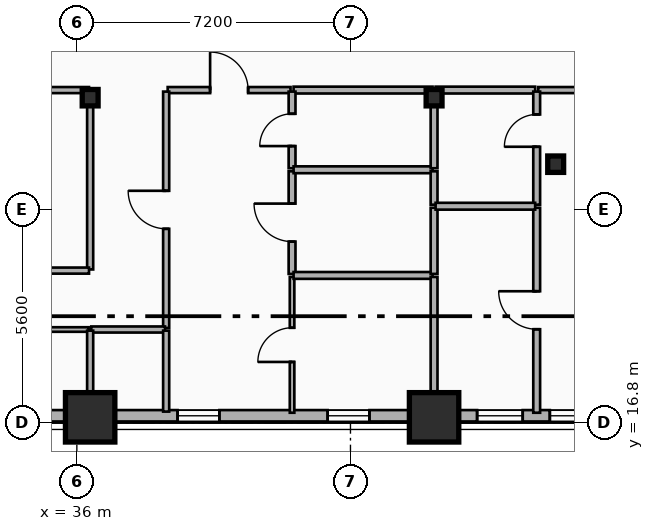
"""IFC4 building model, lengths in metres.
Left out: names, types, materials, properties, quantities, classifications, styles, units other than length and angle.
Written with IfcOpenShell. Run it as: python <this file> out.ifc"""

import sys

from ifc_helpers import new_model, si_unit, direction, frame, frame_2d, origin, origin_2d, place, context, subcontext, project, spatial, rectangle, i_section, extrude, element, fill, save


model = new_model("IFC4")
c1 = context("Model", 3, precision=1e-05, world=origin(), true_north=direction((0.0, 1.0)))
c2 = subcontext(c1, "Body", "Model", "MODEL_VIEW")
j1 = project(units=[si_unit("LENGTHUNIT", "METRE"), si_unit("PLANEANGLEUNIT", "RADIAN")], contexts=[c1])
p1 = place(None, origin())
s1 = spatial("IfcSite", under=j1, at=p1, CompositionType="ELEMENT")
p2 = place(p1, origin())
s2 = spatial("IfcBuilding", under=s1, at=p2, CompositionType="ELEMENT")
p3 = place(p2, frame((0.0, 0.0, 101.3)))
s3 = spatial("IfcBuildingStorey", under=s2, at=p3, CompositionType="ELEMENT", Elevation=101.3)
for number, where, z_axis, x_axis in (
    (1, (36.35, 25.35, 0.0), (0.0, 0.0, 1.0), (1.0, 0.0, 0.0)),
    (2, (45.4, 25.35, 0.0), (0.0, 0.0, 1.0), (1.0, 0.0, 0.0)),
):
    element("IfcColumn", number, at=place(p3, frame(where, z_axis=z_axis, x_axis=x_axis)), inside=s3, PredefinedType="COLUMN", context=c2, shape_type="SweptSolid", body=[
        extrude(i_section(OverallWidth=0.418, OverallDepth=0.432, WebThickness=0.035, FlangeThickness=0.056, FilletRadius=0.015, at=origin_2d()), origin(), (0.0, 0.0, 1.0), 3.5),
    ])
for number, where, z_axis, x_axis in (
    (3, (36.35, 17.048, 0.0), (0.0, -0.09, 0.996), (1.0, 0.0, 0.0)),
    (4, (45.4, 17.048, 0.0), (0.0, -0.09, 0.996), (1.0, 0.0, 0.0)),
):
    element("IfcColumn", number, at=place(p3, frame(where, z_axis=z_axis, x_axis=x_axis)), inside=s3, PredefinedType="COLUMN", context=c2, shape_type="SweptSolid", body=[
        extrude(rectangle(XDim=1.3, YDim=1.3, at=origin_2d()), origin(), (0.0, 0.0, 1.0), 3.514),
    ])
p4 = place(p3, frame((48.6, 23.6, 0.0), z_axis=(0.0, 0.0, 1.0), x_axis=(1.0, 0.0, 0.0)))
e5 = element("IfcColumn", 5, at=p4, inside=s3, PredefinedType="COLUMN", context=c2, shape_type="SweptSolid", body=[
    extrude(i_section(OverallWidth=0.418, OverallDepth=0.432, WebThickness=0.035, FlangeThickness=0.056, FilletRadius=0.015, at=origin_2d()), origin(), (0.0, 0.0, 1.0), 3.5),
])
p5 = place(p3, frame((53.4, 16.98, 0.0), z_axis=(0.0, 0.0, 1.0), x_axis=(-1.0, 0.0, 0.0)))
e6 = element("IfcWall", 6, at=p5, inside=s3, PredefinedType="SOLIDWALL", context=c2, shape_type="SweptSolid", body=[
    extrude(rectangle(XDim=49.2, YDim=0.3, at=frame_2d((24.6, 0.0))), origin(), (0.0, 0.0, 1.0), 2.86),
])
p6 = place(p5, frame((44.246, 0.0, 0.48)))
e7 = element("IfcOpeningElement", 7, at=p6, cuts=e6, PredefinedType="OPENING", context=c2, shape_type="SweptSolid", body=[
    extrude(rectangle(XDim=1.6, YDim=1.95, at=frame_2d((0.8, 0.975))), frame((0.0, 0.16, 0.0), z_axis=(0.0, -1.0, 0.0), x_axis=(1.0, 0.0, 0.0)), (0.0, 0.0, 1.0), 0.32),
])
p7 = place(p5, frame((42.333, 0.0, 0.68)))
e8 = element("IfcOpeningElement", 8, at=p7, cuts=e6, PredefinedType="OPENING", context=c2, shape_type="SweptSolid", body=[
    extrude(rectangle(XDim=1.2, YDim=1.5, at=frame_2d((0.6, 0.75))), frame((0.0, 0.16, 0.0), z_axis=(0.0, -1.0, 0.0), x_axis=(1.0, 0.0, 0.0)), (0.0, 0.0, 1.0), 0.32),
])
p8 = place(p5, frame((33.338, 0.0, 1.48)))
e9 = element("IfcOpeningElement", 9, at=p8, cuts=e6, PredefinedType="OPENING", context=c2, shape_type="SweptSolid", body=[
    extrude(rectangle(XDim=1.1, YDim=1.05, at=frame_2d((0.55, 0.525))), frame((0.0, 0.16, 0.0), z_axis=(0.0, -1.0, 0.0), x_axis=(1.0, 0.0, 0.0)), (0.0, 0.0, 1.0), 0.32),
])
p9 = place(p5, frame((38.935, 0.0, 0.48)))
e10 = element("IfcOpeningElement", 10, at=p9, cuts=e6, PredefinedType="OPENING", context=c2, shape_type="SweptSolid", body=[
    extrude(rectangle(XDim=1.2, YDim=1.5, at=frame_2d((0.6, 0.75))), frame((0.0, 0.16, 0.0), z_axis=(0.0, -1.0, 0.0), x_axis=(1.0, 0.0, 0.0)), (0.0, 0.0, 1.0), 0.32),
])
p10 = place(p5, frame((20.025, 0.0, 0.73)))
e11 = element("IfcOpeningElement", 11, at=p10, cuts=e6, PredefinedType="OPENING", context=c2, shape_type="SweptSolid", body=[
    extrude(rectangle(XDim=1.6, YDim=1.95, at=frame_2d((0.8, 0.975))), frame((0.0, 0.16, 0.0), z_axis=(0.0, -1.0, 0.0), x_axis=(1.0, 0.0, 0.0)), (0.0, 0.0, 1.0), 0.32),
])
p11 = place(p5, frame((13.65, 0.0, 0.52)))
e12 = element("IfcOpeningElement", 12, at=p11, cuts=e6, PredefinedType="OPENING", context=c2, shape_type="SweptSolid", body=[
    extrude(rectangle(XDim=1.1, YDim=1.05, at=frame_2d((0.55, 0.525))), frame((0.0, 0.16, 0.0), z_axis=(0.0, -1.0, 0.0), x_axis=(1.0, 0.0, 0.0)), (0.0, 0.0, 1.0), 0.32),
])
p12 = place(p5, frame((9.701, 0.0, 1.48)))
e13 = element("IfcOpeningElement", 13, at=p12, cuts=e6, PredefinedType="OPENING", context=c2, shape_type="SweptSolid", body=[
    extrude(rectangle(XDim=1.1, YDim=1.05, at=frame_2d((0.55, 0.525))), frame((0.0, 0.16, 0.0), z_axis=(0.0, -1.0, 0.0), x_axis=(1.0, 0.0, 0.0)), (0.0, 0.0, 1.0), 0.32),
])
p13 = place(p5, frame((3.354, 0.0, 0.48)))
e14 = element("IfcOpeningElement", 14, at=p13, cuts=e6, PredefinedType="OPENING", context=c2, shape_type="SweptSolid", body=[
    extrude(rectangle(XDim=1.6, YDim=1.95, at=frame_2d((0.8, 0.975))), frame((0.0, 0.16, 0.0), z_axis=(0.0, -1.0, 0.0), x_axis=(1.0, 0.0, 0.0)), (0.0, 0.0, 1.0), 0.32),
])
p14 = place(p5, frame((5.667, 0.0, 0.68)))
e15 = element("IfcOpeningElement", 15, at=p14, cuts=e6, PredefinedType="OPENING", context=c2, shape_type="SweptSolid", body=[
    extrude(rectangle(XDim=1.2, YDim=1.5, at=frame_2d((0.6, 0.75))), frame((0.0, 0.16, 0.0), z_axis=(0.0, -1.0, 0.0), x_axis=(1.0, 0.0, 0.0)), (0.0, 0.0, 1.0), 0.32),
])
p15 = place(p3, frame((38.39, 25.55, 0.0), z_axis=(0.0, 0.0, 1.0), x_axis=(1.0, 0.0, 0.0)))
e16 = element("IfcWall", 16, at=p15, inside=s3, PredefinedType="PARTITIONING", context=c2, shape_type="SweptSolid", body=[
    extrude(rectangle(XDim=3.233, YDim=0.16, at=frame_2d((1.617, 0.0))), origin(), (0.0, 0.0, 1.0), 3.24),
])
p16 = place(p15, frame((1.116, 0.0, 0.0)))
e17 = element("IfcOpeningElement", 17, at=p16, cuts=e16, PredefinedType="OPENING", context=c2, shape_type="SweptSolid", body=[
    extrude(rectangle(XDim=1.0, YDim=2.15, at=frame_2d((0.5, 1.075))), frame((0.0, 0.09, 0.0), z_axis=(0.0, -1.0, 0.0), x_axis=(1.0, 0.0, 0.0)), (0.0, 0.0, 1.0), 0.18),
])
p17 = place(p3, frame((41.703, 25.55, 0.0), z_axis=(0.0, 0.0, 1.0), x_axis=(1.0, 0.0, 0.0)))
e18 = element("IfcWall", 18, at=p17, inside=s3, PredefinedType="PLUMBINGWALL", context=c2, shape_type="SweptSolid", body=[
    extrude(rectangle(XDim=3.657, YDim=0.18, at=frame_2d((1.829, 0.0))), origin(), (0.0, 0.0, 1.0), 2.31),
])
p18 = place(p3, frame((48.14, 25.55, 0.0), z_axis=(0.0, 0.0, 1.0), x_axis=(1.0, 0.0, 0.0)))
e19 = element("IfcWall", 19, at=p18, inside=s3, PredefinedType="PARTITIONING", context=c2, shape_type="SweptSolid", body=[
    extrude(rectangle(XDim=4.338, YDim=0.16, at=frame_2d((2.169, 0.0))), origin(), (0.0, 0.0, 1.0), 2.57),
])
p19 = place(p18, frame((1.669, 0.0, 0.0)))
e20 = element("IfcOpeningElement", 20, at=p19, cuts=e19, PredefinedType="OPENING", context=c2, shape_type="SweptSolid", body=[
    extrude(rectangle(XDim=1.0, YDim=2.15, at=frame_2d((0.5, 1.075))), frame((0.0, 0.09, 0.0), z_axis=(0.0, -1.0, 0.0), x_axis=(1.0, 0.0, 0.0)), (0.0, 0.0, 1.0), 0.18),
])
p20 = place(p3, frame((45.44, 25.55, 0.0), z_axis=(0.0, 0.0, 1.0), x_axis=(1.0, 0.0, 0.0)))
e21 = element("IfcWall", 21, at=p20, inside=s3, PredefinedType="PLUMBINGWALL", context=c2, shape_type="SweptSolid", body=[
    extrude(rectangle(XDim=2.62, YDim=0.18, at=frame_2d((1.31, 0.0))), origin(), (0.0, 0.0, 1.0), 2.31),
])
p21 = place(p3, frame((38.35, 19.29, 0.0), z_axis=(0.0, 0.0, 1.0), x_axis=(0.0, 1.0, 0.0)))
e22 = element("IfcWall", 22, at=p21, inside=s3, PredefinedType="PARTITIONING", context=c2, shape_type="SweptSolid", body=[
    extrude(rectangle(XDim=6.22, YDim=0.16, at=frame_2d((3.11, 0.0))), origin(), (0.0, 0.0, 1.0), 2.73),
])
p22 = place(p21, frame((2.61, 0.0, 0.0)))
e23 = element("IfcOpeningElement", 23, at=p22, cuts=e22, PredefinedType="OPENING", context=c2, shape_type="SweptSolid", body=[
    extrude(rectangle(XDim=1.0, YDim=2.15, at=frame_2d((0.5, 1.075))), frame((0.0, 0.09, 0.0), z_axis=(0.0, -1.0, 0.0), x_axis=(1.0, 0.0, 0.0)), (0.0, 0.0, 1.0), 0.18),
])
p23 = place(p3, frame((22.84, 19.25, 0.0), z_axis=(0.0, 0.0, 1.0), x_axis=(1.0, 0.0, 0.0)))
e24 = element("IfcWall", 24, at=p23, inside=s3, PredefinedType="PARTITIONING", context=c2, shape_type="SweptSolid", body=[
    extrude(rectangle(XDim=13.47, YDim=0.12, at=frame_2d((6.735, 0.0))), origin(), (0.0, 0.0, 1.0), 2.31),
])
p24 = place(p23, frame((6.285, 0.0, 0.0)))
e25 = element("IfcOpeningElement", 25, at=p24, cuts=e24, PredefinedType="OPENING", context=c2, shape_type="SweptSolid", body=[
    extrude(rectangle(XDim=0.9, YDim=2.1, at=frame_2d((0.45, 1.05))), frame((0.0, 0.07, 0.0), z_axis=(0.0, -1.0, 0.0), x_axis=(1.0, 0.0, 0.0)), (0.0, 0.0, 1.0), 0.14),
])
p25 = place(p3, frame((41.663, 17.06, 0.0), z_axis=(0.0, 0.0, 1.0), x_axis=(0.0, 1.0, 0.0)))
e26 = element("IfcWall", 26, at=p25, inside=s3, PredefinedType="PARTITIONING", context=c2, shape_type="SweptSolid", body=[
    extrude(rectangle(XDim=3.573, YDim=0.12, at=frame_2d((1.787, 0.0))), origin(), (0.0, 0.0, 1.0), 2.73),
])
p26 = place(p25, frame((1.336, 0.0, 0.0)))
e27 = element("IfcOpeningElement", 27, at=p26, cuts=e26, PredefinedType="OPENING", context=c2, shape_type="SweptSolid", body=[
    extrude(rectangle(XDim=0.9, YDim=2.1, at=frame_2d((0.45, 1.05))), frame((0.0, 0.07, 0.0), z_axis=(0.0, -1.0, 0.0), x_axis=(1.0, 0.0, 0.0)), (0.0, 0.0, 1.0), 0.14),
])
p27 = place(p3, frame((41.663, 20.713, 0.0), z_axis=(0.0, 0.0, 1.0), x_axis=(0.0, 1.0, 0.0)))
e28 = element("IfcWall", 28, at=p27, inside=s3, PredefinedType="PLUMBINGWALL", context=c2, shape_type="SweptSolid", body=[
    extrude(rectangle(XDim=2.7, YDim=0.18, at=frame_2d((1.35, 0.0))), origin(), (0.0, 0.0, 1.0), 2.73),
])
p28 = place(p27, frame((0.85, 0.0, 0.0)))
e29 = element("IfcOpeningElement", 29, at=p28, cuts=e28, PredefinedType="OPENING", context=c2, shape_type="SweptSolid", body=[
    extrude(rectangle(XDim=1.0, YDim=2.15, at=frame_2d((0.5, 1.075))), frame((0.0, 0.1, 0.0), z_axis=(0.0, -1.0, 0.0), x_axis=(1.0, 0.0, 0.0)), (0.0, 0.0, 1.0), 0.2),
])
p29 = place(p3, frame((41.663, 23.493, 0.0), z_axis=(0.0, 0.0, 1.0), x_axis=(0.0, 1.0, 0.0)))
e30 = element("IfcWall", 30, at=p29, inside=s3, PredefinedType="PLUMBINGWALL", context=c2, shape_type="SweptSolid", body=[
    extrude(rectangle(XDim=2.017, YDim=0.18, at=frame_2d((1.009, 0.0))), origin(), (0.0, 0.0, 1.0), 3.24),
])
p30 = place(p29, frame((0.583, 0.0, 0.0)))
e31 = element("IfcOpeningElement", 31, at=p30, cuts=e30, PredefinedType="OPENING", context=c2, shape_type="SweptSolid", body=[
    extrude(rectangle(XDim=0.85, YDim=2.1, at=frame_2d((0.425, 1.05))), frame((0.0, 0.1, 0.0), z_axis=(0.0, -1.0, 0.0), x_axis=(1.0, 0.0, 0.0)), (0.0, 0.0, 1.0), 0.2),
])
p31 = place(p3, frame((41.703, 20.673, 0.0), z_axis=(0.0, 0.0, 1.0), x_axis=(1.0, 0.0, 0.0)))
e32 = element("IfcWall", 32, at=p31, inside=s3, PredefinedType="PLUMBINGWALL", context=c2, shape_type="SweptSolid", body=[
    extrude(rectangle(XDim=3.657, YDim=0.18, at=frame_2d((1.829, 0.0))), origin(), (0.0, 0.0, 1.0), 2.31),
])
p32 = place(p3, frame((45.4, 17.06, 0.0), z_axis=(0.0, 0.0, 1.0), x_axis=(0.0, 1.0, 0.0)))
e33 = element("IfcWall", 33, at=p32, inside=s3, PredefinedType="PLUMBINGWALL", context=c2, shape_type="SweptSolid", body=[
    extrude(rectangle(XDim=3.573, YDim=0.18, at=frame_2d((1.787, 0.0))), origin(), (0.0, 0.0, 1.0), 2.31),
])
p33 = place(p3, frame((41.703, 23.453, 0.0), z_axis=(0.0, 0.0, 1.0), x_axis=(1.0, 0.0, 0.0)))
e34 = element("IfcWall", 34, at=p33, inside=s3, PredefinedType="PLUMBINGWALL", context=c2, shape_type="SweptSolid", body=[
    extrude(rectangle(XDim=3.657, YDim=0.18, at=frame_2d((1.829, 0.0))), origin(), (0.0, 0.0, 1.0), 2.31),
])
p34 = place(p3, frame((45.4, 20.713, 0.0), z_axis=(0.0, 0.0, 1.0), x_axis=(0.0, 1.0, 0.0)))
e35 = element("IfcWall", 35, at=p34, inside=s3, PredefinedType="PLUMBINGWALL", context=c2, shape_type="SweptSolid", body=[
    extrude(rectangle(XDim=1.741, YDim=0.18, at=frame_2d((0.871, 0.0))), origin(), (0.0, 0.0, 1.0), 2.31),
])
p35 = place(p3, frame((45.4, 22.534, 0.0), z_axis=(0.0, 0.0, 1.0), x_axis=(0.0, 1.0, 0.0)))
e36 = element("IfcWall", 36, at=p35, inside=s3, PredefinedType="PLUMBINGWALL", context=c2, shape_type="SweptSolid", body=[
    extrude(rectangle(XDim=0.879, YDim=0.18, at=frame_2d((0.439, 0.0))), origin(), (0.0, 0.0, 1.0), 2.31),
])
p36 = place(p3, frame((45.4, 23.493, 0.0), z_axis=(0.0, 0.0, 1.0), x_axis=(0.0, 1.0, 0.0)))
e37 = element("IfcWall", 37, at=p36, inside=s3, PredefinedType="PLUMBINGWALL", context=c2, shape_type="SweptSolid", body=[
    extrude(rectangle(XDim=2.017, YDim=0.18, at=frame_2d((1.009, 0.0))), origin(), (0.0, 0.0, 1.0), 2.31),
])
p37 = place(p3, frame((48.1, 17.06, 0.0), z_axis=(0.0, 0.0, 1.0), x_axis=(0.0, 1.0, 0.0)))
e38 = element("IfcWall", 38, at=p37, inside=s3, PredefinedType="PLUMBINGWALL", context=c2, shape_type="SweptSolid", body=[
    extrude(rectangle(XDim=5.394, YDim=0.18, at=frame_2d((2.697, 0.0))), origin(), (0.0, 0.0, 1.0), 2.72),
])
p38 = place(p37, frame((2.197, 0.0, 0.0)))
e39 = element("IfcOpeningElement", 39, at=p38, cuts=e38, PredefinedType="OPENING", context=c2, shape_type="SweptSolid", body=[
    extrude(rectangle(XDim=1.0, YDim=2.15, at=frame_2d((0.5, 1.075))), frame((0.0, 0.1, 0.0), z_axis=(0.0, -1.0, 0.0), x_axis=(1.0, 0.0, 0.0)), (0.0, 0.0, 1.0), 0.2),
])
p39 = place(p3, frame((48.1, 22.534, 0.0), z_axis=(0.0, 0.0, 1.0), x_axis=(0.0, 1.0, 0.0)))
e40 = element("IfcWall", 40, at=p39, inside=s3, PredefinedType="PLUMBINGWALL", context=c2, shape_type="SweptSolid", body=[
    extrude(rectangle(XDim=2.976, YDim=0.18, at=frame_2d((1.488, 0.0))), origin(), (0.0, 0.0, 1.0), 2.72),
])
p40 = place(p39, frame((1.524, 0.0, 0.0)))
e41 = element("IfcOpeningElement", 41, at=p40, cuts=e40, PredefinedType="OPENING", context=c2, shape_type="SweptSolid", body=[
    extrude(rectangle(XDim=0.85, YDim=2.1, at=frame_2d((0.425, 1.05))), frame((0.0, 0.1, 0.0), z_axis=(0.0, -1.0, 0.0), x_axis=(1.0, 0.0, 0.0)), (0.0, 0.0, 1.0), 0.2),
])
p41 = place(p3, frame((45.44, 22.494, 0.0), z_axis=(0.0, 0.0, 1.0), x_axis=(1.0, 0.0, 0.0)))
e42 = element("IfcWall", 42, at=p41, inside=s3, PredefinedType="PLUMBINGWALL", context=c2, shape_type="SweptSolid", body=[
    extrude(rectangle(XDim=2.62, YDim=0.18, at=frame_2d((1.31, 0.0))), origin(), (0.0, 0.0, 1.0), 2.31),
])
p42 = place(p3, frame((22.83, 25.55, 0.0), z_axis=(0.0, 0.0, 1.0), x_axis=(1.0, 0.0, 0.0)))
e43 = element("IfcWall", 43, at=p42, inside=s3, PredefinedType="PARTITIONING", context=c2, shape_type="SweptSolid", body=[
    extrude(rectangle(XDim=13.49, YDim=0.16, at=frame_2d((6.745, 0.0))), origin(), (0.0, 0.0, 1.0), 2.31),
])
p43 = place(p3, frame((36.38, 19.25, 0.0), z_axis=(0.0, 0.0, 1.0), x_axis=(1.0, 0.0, 0.0)))
e44 = element("IfcWall", 44, at=p43, inside=s3, PredefinedType="PARTITIONING", context=c2, shape_type="SweptSolid", body=[
    extrude(rectangle(XDim=1.94, YDim=0.16, at=frame_2d((0.97, 0.0))), origin(), (0.0, 0.0, 1.0), 2.31),
])
p44 = place(p3, frame((36.35, 20.83, 0.0), z_axis=(0.0, 0.0, 1.0), x_axis=(0.0, 1.0, 0.0)))
e45 = element("IfcWall", 45, at=p44, inside=s3, PredefinedType="PARTITIONING", context=c2, shape_type="SweptSolid", body=[
    extrude(rectangle(XDim=4.69, YDim=0.16, at=frame_2d((2.345, 0.0))), origin(), (0.0, 0.0, 1.0), 2.31),
])
p45 = place(p3, frame((34.48, 20.8, 0.0), z_axis=(0.0, 0.0, 1.0), x_axis=(1.0, 0.0, 0.0)))
e46 = element("IfcWall", 46, at=p45, inside=s3, PredefinedType="PARTITIONING", context=c2, shape_type="SweptSolid", body=[
    extrude(rectangle(XDim=1.84, YDim=0.16, at=frame_2d((0.92, 0.0))), origin(), (0.0, 0.0, 1.0), 2.31),
])
p46 = place(p3, frame((36.35, 17.09, 0.0), z_axis=(0.0, 0.0, 1.0), x_axis=(0.0, 1.0, 0.0)))
e47 = element("IfcWall", 47, at=p46, inside=s3, PredefinedType="PARTITIONING", context=c2, shape_type="SweptSolid", body=[
    extrude(rectangle(XDim=2.13, YDim=0.16, at=frame_2d((1.065, 0.0))), origin(), (0.0, 0.0, 1.0), 2.31),
])
p47 = place(p3, frame((38.35, 17.09, 0.0), z_axis=(0.0, 0.0, 1.0), x_axis=(0.0, 1.0, 0.0)))
e48 = element("IfcWall", 48, at=p47, inside=s3, PredefinedType="PARTITIONING", context=c2, shape_type="SweptSolid", body=[
    extrude(rectangle(XDim=2.13, YDim=0.16, at=frame_2d((1.065, 0.0))), origin(), (0.0, 0.0, 1.0), 2.86),
])
p48 = place(p11, origin())
e49 = element("IfcWindow", 49, at=p48, inside=s3, PartitioningType="SINGLE_PANEL", PredefinedType="WINDOW", context=c2, shape_type="SweptSolid", body=[
    extrude(rectangle(XDim=1.1, YDim=1.05, at=frame_2d((0.55, 0.525))), frame((0.0, 0.03, 0.0), z_axis=(0.0, -1.0, 0.0), x_axis=(1.0, 0.0, 0.0)), (0.0, 0.0, 1.0), 0.06),
])
fill(e12, e49)
p49 = place(p12, origin())
e50 = element("IfcWindow", 50, at=p49, inside=s3, PartitioningType="SINGLE_PANEL", PredefinedType="WINDOW", context=c2, shape_type="SweptSolid", body=[
    extrude(rectangle(XDim=1.1, YDim=1.05, at=frame_2d((0.55, 0.525))), frame((0.0, 0.03, 0.0), z_axis=(0.0, -1.0, 0.0), x_axis=(1.0, 0.0, 0.0)), (0.0, 0.0, 1.0), 0.06),
])
fill(e13, e50)
p50 = place(p13, origin())
e51 = element("IfcWindow", 51, at=p50, inside=s3, PartitioningType="SINGLE_PANEL", PredefinedType="WINDOW", context=c2, shape_type="SweptSolid", body=[
    extrude(rectangle(XDim=1.6, YDim=1.95, at=frame_2d((0.8, 0.975))), frame((0.0, 0.03, 0.0), z_axis=(0.0, -1.0, 0.0), x_axis=(1.0, 0.0, 0.0)), (0.0, 0.0, 1.0), 0.06),
])
fill(e14, e51)
p51 = place(p14, origin())
e52 = element("IfcWindow", 52, at=p51, inside=s3, PartitioningType="SINGLE_PANEL", PredefinedType="WINDOW", context=c2, shape_type="SweptSolid", body=[
    extrude(rectangle(XDim=1.2, YDim=1.5, at=frame_2d((0.6, 0.75))), frame((0.0, 0.03, 0.0), z_axis=(0.0, -1.0, 0.0), x_axis=(1.0, 0.0, 0.0)), (0.0, 0.0, 1.0), 0.06),
])
fill(e15, e52)
p52 = place(p16, origin())
e53 = element("IfcDoor", 53, at=p52, inside=s3, OperationType="SINGLE_SWING_LEFT", PredefinedType="DOOR", context=c2, shape_type="SweptSolid", body=[
    extrude(rectangle(XDim=1.0, YDim=2.15, at=frame_2d((0.5, 1.075))), frame((0.0, 0.025, 0.0), z_axis=(0.0, -1.0, 0.0), x_axis=(1.0, 0.0, 0.0)), (0.0, 0.0, 1.0), 0.05),
])
fill(e17, e53)
p53 = place(p22, origin())
e54 = element("IfcDoor", 54, at=p53, inside=s3, OperationType="SINGLE_SWING_RIGHT", PredefinedType="DOOR", context=c2, shape_type="SweptSolid", body=[
    extrude(rectangle(XDim=1.0, YDim=2.15, at=frame_2d((0.5, 1.075))), frame((0.0, 0.025, 0.0), z_axis=(0.0, -1.0, 0.0), x_axis=(1.0, 0.0, 0.0)), (0.0, 0.0, 1.0), 0.05),
])
fill(e23, e54)
p54 = place(p26, origin())
e55 = element("IfcDoor", 55, at=p54, inside=s3, OperationType="SINGLE_SWING_LEFT", PredefinedType="DOOR", context=c2, shape_type="SweptSolid", body=[
    extrude(rectangle(XDim=0.9, YDim=2.1, at=frame_2d((0.45, 1.05))), frame((0.0, 0.025, 0.0), z_axis=(0.0, -1.0, 0.0), x_axis=(1.0, 0.0, 0.0)), (0.0, 0.0, 1.0), 0.05),
])
fill(e27, e55)
p55 = place(p28, origin())
e56 = element("IfcDoor", 56, at=p55, inside=s3, OperationType="SINGLE_SWING_RIGHT", PredefinedType="DOOR", context=c2, shape_type="SweptSolid", body=[
    extrude(rectangle(XDim=1.0, YDim=2.15, at=frame_2d((0.5, 1.075))), frame((0.0, 0.025, 0.0), z_axis=(0.0, -1.0, 0.0), x_axis=(1.0, 0.0, 0.0)), (0.0, 0.0, 1.0), 0.05),
])
fill(e29, e56)
p56 = place(p30, origin())
e57 = element("IfcDoor", 57, at=p56, inside=s3, OperationType="SINGLE_SWING_LEFT", PredefinedType="DOOR", context=c2, shape_type="SweptSolid", body=[
    extrude(rectangle(XDim=0.85, YDim=2.1, at=frame_2d((0.425, 1.05))), frame((0.0, 0.025, 0.0), z_axis=(0.0, -1.0, 0.0), x_axis=(1.0, 0.0, 0.0)), (0.0, 0.0, 1.0), 0.05),
])
fill(e31, e57)
p57 = place(p38, origin())
e58 = element("IfcDoor", 58, at=p57, inside=s3, OperationType="SINGLE_SWING_RIGHT", PredefinedType="DOOR", context=c2, shape_type="SweptSolid", body=[
    extrude(rectangle(XDim=1.0, YDim=2.15, at=frame_2d((0.5, 1.075))), frame((0.0, 0.025, 0.0), z_axis=(0.0, -1.0, 0.0), x_axis=(1.0, 0.0, 0.0)), (0.0, 0.0, 1.0), 0.05),
])
fill(e39, e58)
p58 = place(p40, origin())
e59 = element("IfcDoor", 59, at=p58, inside=s3, OperationType="SINGLE_SWING_LEFT", PredefinedType="DOOR", context=c2, shape_type="SweptSolid", body=[
    extrude(rectangle(XDim=0.85, YDim=2.1, at=frame_2d((0.425, 1.05))), frame((0.0, 0.025, 0.0), z_axis=(0.0, -1.0, 0.0), x_axis=(1.0, 0.0, 0.0)), (0.0, 0.0, 1.0), 0.05),
])
fill(e41, e59)
save(model, sys.argv[1])
